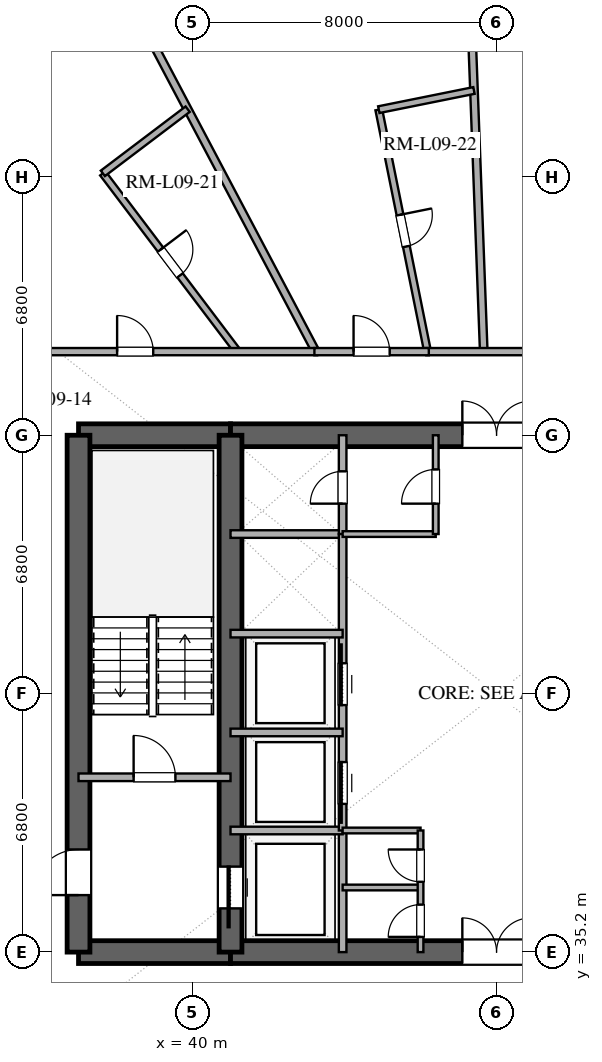
"""IFC4 building model, lengths in metres.
Left out: names, types, materials, properties, quantities, classifications, styles, units other than length and angle.
Written with IfcOpenShell. Run it as: python <this file> out.ifc"""

import sys

from ifc_helpers import new_model, si_unit, direction, frame, frame_2d, origin, place, context, subcontext, project, spatial, rectangle, extrude, element, fill, save


model = new_model("IFC4")
c1 = context("Model", 3, precision=1e-05, world=origin(), true_north=direction((0.0, 1.0)))
c2 = subcontext(c1, "Body", "Model", "MODEL_VIEW")
j1 = project(units=[si_unit("LENGTHUNIT", "METRE"), si_unit("PLANEANGLEUNIT", "RADIAN")], contexts=[c1])
p1 = place(None, origin())
s1 = spatial("IfcSite", under=j1, at=p1, CompositionType="ELEMENT")
p2 = place(p1, origin())
s2 = spatial("IfcBuilding", under=s1, at=p2, CompositionType="ELEMENT")
p3 = place(p2, frame((0.0, 0.0, 42.6)))
s3 = spatial("IfcBuildingStorey", under=s2, at=p3, CompositionType="ELEMENT", Elevation=42.6)
p4 = place(p3, frame((37.0, 35.2, 0.0), z_axis=(0.0, 0.0, 1.0), x_axis=(1.0, 0.0, 0.0)))
e1 = element("IfcWall", 1, at=p4, inside=s3, PredefinedType="SHEAR", context=c2, shape_type="SweptSolid", body=[
    extrude(rectangle(XDim=4.0, YDim=0.6, at=frame_2d((2.0, 0.0))), origin(), (0.0, 0.0, 1.0), 3.38),
])
p5 = place(p3, frame((41.0, 35.2, 0.0), z_axis=(0.0, 0.0, 1.0), x_axis=(1.0, 0.0, 0.0)))
e2 = element("IfcWall", 2, at=p5, inside=s3, PredefinedType="SHEAR", context=c2, shape_type="SweptSolid", body=[
    extrude(rectangle(XDim=14.0, YDim=0.6, at=frame_2d((7.0, 0.0))), origin(), (0.0, 0.0, 1.0), 3.38),
])
p6 = place(p5, frame((6.1, 0.0, 0.0)))
e3 = element("IfcOpeningElement", 3, at=p6, cuts=e2, PredefinedType="OPENING", context=c2, shape_type="SweptSolid", body=[
    extrude(rectangle(XDim=1.8, YDim=2.25, at=frame_2d((0.9, 1.125))), frame((0.0, 0.31, 0.0), z_axis=(0.0, -1.0, 0.0), x_axis=(1.0, 0.0, 0.0)), (0.0, 0.0, 1.0), 0.62),
])
p7 = place(p3, frame((37.0, 48.8, 0.0), z_axis=(0.0, 0.0, 1.0), x_axis=(1.0, 0.0, 0.0)))
e4 = element("IfcWall", 4, at=p7, inside=s3, PredefinedType="SHEAR", context=c2, shape_type="SweptSolid", body=[
    extrude(rectangle(XDim=4.0, YDim=0.6, at=frame_2d((2.0, 0.0))), origin(), (0.0, 0.0, 1.0), 3.38),
])
p8 = place(p3, frame((41.0, 48.8, 0.0), z_axis=(0.0, 0.0, 1.0), x_axis=(1.0, 0.0, 0.0)))
e5 = element("IfcWall", 5, at=p8, inside=s3, PredefinedType="SHEAR", context=c2, shape_type="SweptSolid", body=[
    extrude(rectangle(XDim=14.0, YDim=0.6, at=frame_2d((7.0, 0.0))), origin(), (0.0, 0.0, 1.0), 3.38),
])
p9 = place(p8, frame((6.1, 0.0, 0.0)))
e6 = element("IfcOpeningElement", 6, at=p9, cuts=e5, PredefinedType="OPENING", context=c2, shape_type="SweptSolid", body=[
    extrude(rectangle(XDim=1.8, YDim=2.25, at=frame_2d((0.9, 1.125))), frame((0.0, 0.31, 0.0), z_axis=(0.0, -1.0, 0.0), x_axis=(1.0, 0.0, 0.0)), (0.0, 0.0, 1.0), 0.62),
])
p10 = place(p3, frame((37.0, 35.2, 0.0), z_axis=(0.0, 0.0, 1.0), x_axis=(0.0, 1.0, 0.0)))
e7 = element("IfcWall", 7, at=p10, inside=s3, PredefinedType="SHEAR", context=c2, shape_type="SweptSolid", body=[
    extrude(rectangle(XDim=13.6, YDim=0.6, at=frame_2d((6.8, 0.0))), origin(), (0.0, 0.0, 1.0), 3.38),
])
p11 = place(p10, frame((1.5, 0.0, 0.0)))
e8 = element("IfcOpeningElement", 8, at=p11, cuts=e7, PredefinedType="OPENING", context=c2, shape_type="SweptSolid", body=[
    extrude(rectangle(XDim=1.2, YDim=2.15, at=frame_2d((0.6, 1.075))), frame((0.0, 0.31, 0.0), z_axis=(0.0, -1.0, 0.0), x_axis=(1.0, 0.0, 0.0)), (0.0, 0.0, 1.0), 0.62),
])
p12 = place(p3, frame((41.0, 35.2, 0.0), z_axis=(0.0, 0.0, 1.0), x_axis=(0.0, 1.0, 0.0)))
e9 = element("IfcWall", 9, at=p12, inside=s3, PredefinedType="SHEAR", context=c2, shape_type="SweptSolid", body=[
    extrude(rectangle(XDim=13.6, YDim=0.6, at=frame_2d((6.8, 0.0))), origin(), (0.0, 0.0, 1.0), 3.38),
])
p13 = place(p12, frame((1.15, 0.0, 0.0)))
e10 = element("IfcOpeningElement", 10, at=p13, cuts=e9, PredefinedType="OPENING", context=c2, shape_type="SweptSolid", body=[
    extrude(rectangle(XDim=1.1, YDim=2.2, at=frame_2d((0.55, 1.1))), frame((0.0, 0.31, 0.0), z_axis=(0.0, -1.0, 0.0), x_axis=(1.0, 0.0, 0.0)), (0.0, 0.0, 1.0), 0.62),
])
p14 = place(p3, frame((37.0, 39.8, 0.0), z_axis=(0.0, 0.0, 1.0), x_axis=(1.0, 0.0, 0.0)))
e11 = element("IfcWall", 11, at=p14, inside=s3, PredefinedType="SOLIDWALL", context=c2, shape_type="SweptSolid", body=[
    extrude(rectangle(XDim=4.0, YDim=0.2, at=frame_2d((2.0, 0.0))), origin(), (0.0, 0.0, 1.0), 2.74),
])
p15 = place(p14, frame((1.45, 0.0, 0.0)))
e12 = element("IfcOpeningElement", 12, at=p15, cuts=e11, PredefinedType="OPENING", context=c2, shape_type="SweptSolid", body=[
    extrude(rectangle(XDim=1.1, YDim=2.15, at=frame_2d((0.55, 1.075))), frame((0.0, 0.11, 0.0), z_axis=(0.0, -1.0, 0.0), x_axis=(1.0, 0.0, 0.0)), (0.0, 0.0, 1.0), 0.22),
])
p16 = place(p3, frame((43.95, 35.2, 0.0), z_axis=(0.0, 0.0, 1.0), x_axis=(0.0, 1.0, 0.0)))
e13 = element("IfcWall", 13, at=p16, inside=s3, PredefinedType="SOLIDWALL", context=c2, shape_type="SweptSolid", body=[
    extrude(rectangle(XDim=3.2, YDim=0.2, at=frame_2d((1.6, 0.0))), origin(), (0.0, 0.0, 1.0), 2.74),
])
for number, where, z_axis, x_axis in (
    (14, (41.0, 38.4, 0.0), (0.0, 0.0, 1.0), (1.0, 0.0, 0.0)),
    (15, (41.0, 46.2, 0.0), (0.0, 0.0, 1.0), (1.0, 0.0, 0.0)),
):
    element("IfcWall", number, at=place(p3, frame(where, z_axis=z_axis, x_axis=x_axis)), inside=s3, PredefinedType="SOLIDWALL", context=c2, shape_type="SweptSolid", body=[
        extrude(rectangle(XDim=2.95, YDim=0.2, at=frame_2d((1.475, 0.0))), origin(), (0.0, 0.0, 1.0), 2.74),
    ])
p17 = place(p3, frame((43.95, 46.2, 0.0), z_axis=(0.0, 0.0, 1.0), x_axis=(0.0, 1.0, 0.0)))
e16 = element("IfcWall", 16, at=p17, inside=s3, PredefinedType="SOLIDWALL", context=c2, shape_type="SweptSolid", body=[
    extrude(rectangle(XDim=2.6, YDim=0.2, at=frame_2d((1.3, 0.0))), origin(), (0.0, 0.0, 1.0), 2.74),
])
p18 = place(p17, frame((0.8, 0.0, 0.0)))
e17 = element("IfcOpeningElement", 17, at=p18, cuts=e16, PredefinedType="OPENING", context=c2, shape_type="SweptSolid", body=[
    extrude(rectangle(XDim=0.85, YDim=2.15, at=frame_2d((0.425, 1.075))), frame((0.0, 0.11, 0.0), z_axis=(0.0, -1.0, 0.0), x_axis=(1.0, 0.0, 0.0)), (0.0, 0.0, 1.0), 0.22),
])
p19 = place(p3, frame((43.95, 38.4, 0.0), z_axis=(0.0, 0.0, 1.0), x_axis=(0.0, 1.0, 0.0)))
e18 = element("IfcWall", 18, at=p19, inside=s3, PredefinedType="SOLIDWALL", context=c2, shape_type="SweptSolid", body=[
    extrude(rectangle(XDim=7.8, YDim=0.2, at=frame_2d((3.9, 0.0))), origin(), (0.0, 0.0, 1.0), 2.74),
])
p20 = place(p19, frame((0.7, 0.0, 0.0)))
e19 = element("IfcOpeningElement", 19, at=p20, cuts=e18, PredefinedType="OPENING", context=c2, shape_type="SweptSolid", body=[
    extrude(rectangle(XDim=1.1, YDim=2.2, at=frame_2d((0.55, 1.1))), frame((0.0, 0.11, 0.0), z_axis=(0.0, -1.0, 0.0), x_axis=(1.0, 0.0, 0.0)), (0.0, 0.0, 1.0), 0.22),
])
p21 = place(p19, frame((3.3, 0.0, 0.0)))
e20 = element("IfcOpeningElement", 20, at=p21, cuts=e18, PredefinedType="OPENING", context=c2, shape_type="SweptSolid", body=[
    extrude(rectangle(XDim=1.1, YDim=2.2, at=frame_2d((0.55, 1.1))), frame((0.0, 0.11, 0.0), z_axis=(0.0, -1.0, 0.0), x_axis=(1.0, 0.0, 0.0)), (0.0, 0.0, 1.0), 0.22),
])
for number, where, z_axis, x_axis in (
    (21, (41.0, 40.98, 0.0), (0.0, 0.0, 1.0), (1.0, 0.0, 0.0)),
    (22, (41.0, 43.58, 0.0), (0.0, 0.0, 1.0), (1.0, 0.0, 0.0)),
):
    element("IfcWall", number, at=place(p3, frame(where, z_axis=z_axis, x_axis=x_axis)), inside=s3, PredefinedType="SOLIDWALL", context=c2, shape_type="SweptSolid", body=[
        extrude(rectangle(XDim=2.95, YDim=0.2, at=frame_2d((1.475, 0.0))), origin(), (0.0, 0.0, 1.0), 2.74),
    ])
for number, where, z_axis, x_axis in (
    (23, (43.95, 36.9, 0.0), (0.0, 0.0, 1.0), (1.0, 0.0, 0.0)),
    (24, (43.95, 38.4, 0.0), (0.0, 0.0, 1.0), (1.0, 0.0, 0.0)),
):
    element("IfcWall", number, at=place(p3, frame(where, z_axis=z_axis, x_axis=x_axis)), inside=s3, PredefinedType="PARTITIONING", context=c2, shape_type="SweptSolid", body=[
        extrude(rectangle(XDim=2.05, YDim=0.15, at=frame_2d((1.025, 0.0))), origin(), (0.0, 0.0, 1.0), 2.74),
    ])
p22 = place(p3, frame((46.0, 35.2, 0.0), z_axis=(0.0, 0.0, 1.0), x_axis=(0.0, 1.0, 0.0)))
e25 = element("IfcWall", 25, at=p22, inside=s3, PredefinedType="PARTITIONING", context=c2, shape_type="SweptSolid", body=[
    extrude(rectangle(XDim=3.2, YDim=0.15, at=frame_2d((1.6, 0.0))), origin(), (0.0, 0.0, 1.0), 2.74),
])
p23 = place(p22, frame((0.4, 0.0, 0.0)))
e26 = element("IfcOpeningElement", 26, at=p23, cuts=e25, PredefinedType="OPENING", context=c2, shape_type="SweptSolid", body=[
    extrude(rectangle(XDim=0.85, YDim=2.15, at=frame_2d((0.425, 1.075))), frame((0.0, 0.085, 0.0), z_axis=(0.0, -1.0, 0.0), x_axis=(1.0, 0.0, 0.0)), (0.0, 0.0, 1.0), 0.17),
])
p24 = place(p22, frame((1.85, 0.0, 0.0)))
e27 = element("IfcOpeningElement", 27, at=p24, cuts=e25, PredefinedType="OPENING", context=c2, shape_type="SweptSolid", body=[
    extrude(rectangle(XDim=0.85, YDim=2.15, at=frame_2d((0.425, 1.075))), frame((0.0, 0.085, 0.0), z_axis=(0.0, -1.0, 0.0), x_axis=(1.0, 0.0, 0.0)), (0.0, 0.0, 1.0), 0.17),
])
p25 = place(p3, frame((43.95, 46.2, 0.0), z_axis=(0.0, 0.0, 1.0), x_axis=(1.0, 0.0, 0.0)))
e28 = element("IfcWall", 28, at=p25, inside=s3, PredefinedType="PARTITIONING", context=c2, shape_type="SweptSolid", body=[
    extrude(rectangle(XDim=2.45, YDim=0.15, at=frame_2d((1.225, 0.0))), origin(), (0.0, 0.0, 1.0), 2.74),
])
p26 = place(p3, frame((46.4, 46.2, 0.0), z_axis=(0.0, 0.0, 1.0), x_axis=(0.0, 1.0, 0.0)))
e29 = element("IfcWall", 29, at=p26, inside=s3, PredefinedType="PARTITIONING", context=c2, shape_type="SweptSolid", body=[
    extrude(rectangle(XDim=2.6, YDim=0.15, at=frame_2d((1.3, 0.0))), origin(), (0.0, 0.0, 1.0), 2.74),
])
p27 = place(p26, frame((0.8, 0.0, 0.0)))
e30 = element("IfcOpeningElement", 30, at=p27, cuts=e29, PredefinedType="OPENING", context=c2, shape_type="SweptSolid", body=[
    extrude(rectangle(XDim=0.9, YDim=2.15, at=frame_2d((0.45, 1.075))), frame((0.0, 0.085, 0.0), z_axis=(0.0, -1.0, 0.0), x_axis=(1.0, 0.0, 0.0)), (0.0, 0.0, 1.0), 0.17),
])
p28 = place(p3, frame((47.663, 51.0, 0.0), z_axis=(0.0, 0.0, 1.0), x_axis=(-0.037384345878, 0.999300961014, 0.0)))
e31 = element("IfcWall", 31, at=p28, inside=s3, PredefinedType="PARTITIONING", context=c2, shape_type="SweptSolid", body=[
    extrude(rectangle(XDim=14.877, YDim=0.2, at=frame_2d((7.438, 0.0))), origin(), (0.0, 0.0, 1.0), 2.74),
])
p29 = place(p3, frame((43.243, 51.0, 0.0), z_axis=(0.0, 0.0, 1.0), x_axis=(-0.467270516294, 0.884114395654, 0.0)))
e32 = element("IfcWall", 32, at=p29, inside=s3, PredefinedType="PARTITIONING", context=c2, shape_type="SweptSolid", body=[
    extrude(rectangle(XDim=14.96, YDim=0.2, at=frame_2d((7.48, 0.0))), origin(), (0.0, 0.0, 1.0), 2.74),
])
p30 = place(p3, frame((44.902, 57.367, 0.0), z_axis=(0.0, 0.0, 1.0), x_axis=(0.197648412503, -0.980272974755, 0.0)))
e33 = element("IfcWall", 33, at=p30, inside=s3, PredefinedType="PLUMBINGWALL", context=c2, shape_type="SweptSolid", body=[
    extrude(rectangle(XDim=6.495, YDim=0.18, at=frame_2d((3.248, 0.0))), origin(), (0.0, 0.0, 1.0), 2.74),
])
p31 = place(p30, frame((2.823, 0.0, 0.0)))
e34 = element("IfcOpeningElement", 34, at=p31, cuts=e33, PredefinedType="OPENING", context=c2, shape_type="SweptSolid", body=[
    extrude(rectangle(XDim=0.85, YDim=2.1, at=frame_2d((0.425, 1.05))), frame((0.0, 0.1, 0.0), z_axis=(0.0, -1.0, 0.0), x_axis=(1.0, 0.0, 0.0)), (0.0, 0.0, 1.0), 0.2),
])
p32 = place(p3, frame((37.64, 55.691, 0.0), z_axis=(0.0, 0.0, 1.0), x_axis=(0.603401299207, -0.797437691682, 0.0)))
e35 = element("IfcWall", 35, at=p32, inside=s3, PredefinedType="PLUMBINGWALL", context=c2, shape_type="SweptSolid", body=[
    extrude(rectangle(XDim=5.882, YDim=0.18, at=frame_2d((2.941, 0.0))), origin(), (0.0, 0.0, 1.0), 2.74),
])
p33 = place(p32, frame((2.516, 0.0, 0.0)))
e36 = element("IfcOpeningElement", 36, at=p33, cuts=e35, PredefinedType="OPENING", context=c2, shape_type="SweptSolid", body=[
    extrude(rectangle(XDim=0.85, YDim=2.1, at=frame_2d((0.425, 1.05))), frame((0.0, 0.1, 0.0), z_axis=(0.0, -1.0, 0.0), x_axis=(1.0, 0.0, 0.0)), (0.0, 0.0, 1.0), 0.2),
])
p34 = place(p3, frame((34.8, 51.0, 0.0), z_axis=(0.0, 0.0, 1.0), x_axis=(1.0, 0.0, 0.0)))
e37 = element("IfcWall", 37, at=p34, inside=s3, PredefinedType="PARTITIONING", context=c2, shape_type="SweptSolid", body=[
    extrude(rectangle(XDim=8.479, YDim=0.19, at=frame_2d((4.24, 0.0))), origin(), (0.0, 0.0, 1.0), 2.74),
])
p35 = place(p34, frame((3.216, 0.0, 0.0)))
e38 = element("IfcOpeningElement", 38, at=p35, cuts=e37, PredefinedType="OPENING", context=c2, shape_type="SweptSolid", body=[
    extrude(rectangle(XDim=0.95, YDim=2.15, at=frame_2d((0.475, 1.075))), frame((0.0, 0.105, 0.0), z_axis=(0.0, -1.0, 0.0), x_axis=(1.0, 0.0, 0.0)), (0.0, 0.0, 1.0), 0.21),
])
p36 = place(p3, frame((46.153, 51.0, 0.0), z_axis=(0.0, 0.0, 1.0), x_axis=(1.0, 0.0, 0.0)))
e39 = element("IfcWall", 39, at=p36, inside=s3, PredefinedType="PARTITIONING", context=c2, shape_type="SweptSolid", body=[
    extrude(rectangle(XDim=15.047, YDim=0.19, at=frame_2d((7.524, 0.0))), origin(), (0.0, 0.0, 1.0), 2.74),
])
p37 = place(p36, frame((3.144, 0.0, 0.0)))
e40 = element("IfcOpeningElement", 40, at=p37, cuts=e39, PredefinedType="OPENING", context=c2, shape_type="SweptSolid", body=[
    extrude(rectangle(XDim=1.0, YDim=2.2, at=frame_2d((0.5, 1.1))), frame((0.0, 0.105, 0.0), z_axis=(0.0, -1.0, 0.0), x_axis=(1.0, 0.0, 0.0)), (0.0, 0.0, 1.0), 0.21),
])
p38 = place(p36, frame((7.119, 0.0, 0.0)))
e41 = element("IfcOpeningElement", 41, at=p38, cuts=e39, PredefinedType="OPENING", context=c2, shape_type="SweptSolid", body=[
    extrude(rectangle(XDim=0.95, YDim=2.15, at=frame_2d((0.475, 1.075))), frame((0.0, 0.105, 0.0), z_axis=(0.0, -1.0, 0.0), x_axis=(1.0, 0.0, 0.0)), (0.0, 0.0, 1.0), 0.21),
])
p39 = place(p3, frame((43.207, 51.0, 0.0), z_axis=(0.0, 0.0, 1.0), x_axis=(1.0, 0.0, 0.0)))
e42 = element("IfcWall", 42, at=p39, inside=s3, PredefinedType="PARTITIONING", context=c2, shape_type="SweptSolid", body=[
    extrude(rectangle(XDim=3.011, YDim=0.19, at=frame_2d((1.505, 0.0))), origin(), (0.0, 0.0, 1.0), 2.74),
])
p40 = place(p39, frame((1.03, 0.0, 0.0)))
e43 = element("IfcOpeningElement", 43, at=p40, cuts=e42, PredefinedType="OPENING", context=c2, shape_type="SweptSolid", body=[
    extrude(rectangle(XDim=0.95, YDim=2.15, at=frame_2d((0.475, 1.075))), frame((0.0, 0.105, 0.0), z_axis=(0.0, -1.0, 0.0), x_axis=(1.0, 0.0, 0.0)), (0.0, 0.0, 1.0), 0.21),
])
p41 = place(p3, frame((39.872, 57.379, 0.0), z_axis=(0.0, 0.0, 1.0), x_axis=(-0.797438154909, -0.603400687019, 0.0)))
e44 = element("IfcWall", 44, at=p41, inside=s3, PredefinedType="PLUMBINGWALL", context=c2, shape_type="SweptSolid", body=[
    extrude(rectangle(XDim=2.798, YDim=0.18, at=frame_2d((1.399, 0.0))), origin(), (0.0, 0.0, 1.0), 2.74),
])
p42 = place(p3, frame((47.406, 57.872, 0.0), z_axis=(0.0, 0.0, 1.0), x_axis=(-0.980278128955, -0.1976228476, 0.0)))
e45 = element("IfcWall", 45, at=p42, inside=s3, PredefinedType="PLUMBINGWALL", context=c2, shape_type="SweptSolid", body=[
    extrude(rectangle(XDim=2.555, YDim=0.18, at=frame_2d((1.277, 0.0))), origin(), (0.0, 0.0, 1.0), 2.74),
])
p43 = place(p13, origin())
e46 = element("IfcDoor", 46, at=p43, inside=s3, OperationType="SLIDING_TO_LEFT", PredefinedType="DOOR", context=c2, shape_type="SweptSolid", body=[
    extrude(rectangle(XDim=1.1, YDim=2.2, at=frame_2d((0.55, 1.1))), frame((0.0, 0.025, 0.0), z_axis=(0.0, -1.0, 0.0), x_axis=(1.0, 0.0, 0.0)), (0.0, 0.0, 1.0), 0.05),
])
fill(e10, e46)
p44 = place(p11, origin())
e47 = element("IfcDoor", 47, at=p44, inside=s3, OperationType="SINGLE_SWING_LEFT", PredefinedType="DOOR", context=c2, shape_type="SweptSolid", body=[
    extrude(rectangle(XDim=1.2, YDim=2.15, at=frame_2d((0.6, 1.075))), frame((0.0, 0.025, 0.0), z_axis=(0.0, -1.0, 0.0), x_axis=(1.0, 0.0, 0.0)), (0.0, 0.0, 1.0), 0.05),
])
fill(e8, e47)
p45 = place(p6, origin())
e48 = element("IfcDoor", 48, at=p45, inside=s3, OperationType="DOUBLE_DOOR_SINGLE_SWING", PredefinedType="DOOR", context=c2, shape_type="SweptSolid", body=[
    extrude(rectangle(XDim=1.8, YDim=2.25, at=frame_2d((0.9, 1.125))), frame((0.0, 0.025, 0.0), z_axis=(0.0, -1.0, 0.0), x_axis=(1.0, 0.0, 0.0)), (0.0, 0.0, 1.0), 0.05),
])
fill(e3, e48)
p46 = place(p9, origin())
e49 = element("IfcDoor", 49, at=p46, inside=s3, OperationType="DOUBLE_DOOR_SINGLE_SWING", PredefinedType="DOOR", context=c2, shape_type="SweptSolid", body=[
    extrude(rectangle(XDim=1.8, YDim=2.25, at=frame_2d((0.9, 1.125))), frame((0.0, 0.025, 0.0), z_axis=(0.0, -1.0, 0.0), x_axis=(1.0, 0.0, 0.0)), (0.0, 0.0, 1.0), 0.05),
])
fill(e6, e49)
p47 = place(p15, origin())
e50 = element("IfcDoor", 50, at=p47, inside=s3, OperationType="SINGLE_SWING_LEFT", PredefinedType="DOOR", context=c2, shape_type="SweptSolid", body=[
    extrude(rectangle(XDim=1.1, YDim=2.15, at=frame_2d((0.55, 1.075))), frame((0.0, 0.025, 0.0), z_axis=(0.0, -1.0, 0.0), x_axis=(1.0, 0.0, 0.0)), (0.0, 0.0, 1.0), 0.05),
])
fill(e12, e50)
p48 = place(p18, origin())
e51 = element("IfcDoor", 51, at=p48, inside=s3, OperationType="SINGLE_SWING_LEFT", PredefinedType="DOOR", context=c2, shape_type="SweptSolid", body=[
    extrude(rectangle(XDim=0.85, YDim=2.15, at=frame_2d((0.425, 1.075))), frame((0.0, 0.025, 0.0), z_axis=(0.0, -1.0, 0.0), x_axis=(1.0, 0.0, 0.0)), (0.0, 0.0, 1.0), 0.05),
])
fill(e17, e51)
p49 = place(p20, origin())
e52 = element("IfcDoor", 52, at=p49, inside=s3, OperationType="SLIDING_TO_LEFT", PredefinedType="DOOR", context=c2, shape_type="SweptSolid", body=[
    extrude(rectangle(XDim=1.1, YDim=2.2, at=frame_2d((0.55, 1.1))), frame((0.0, 0.025, 0.0), z_axis=(0.0, -1.0, 0.0), x_axis=(1.0, 0.0, 0.0)), (0.0, 0.0, 1.0), 0.05),
])
fill(e19, e52)
p50 = place(p21, origin())
e53 = element("IfcDoor", 53, at=p50, inside=s3, OperationType="SLIDING_TO_RIGHT", PredefinedType="DOOR", context=c2, shape_type="SweptSolid", body=[
    extrude(rectangle(XDim=1.1, YDim=2.2, at=frame_2d((0.55, 1.1))), frame((0.0, 0.025, 0.0), z_axis=(0.0, -1.0, 0.0), x_axis=(1.0, 0.0, 0.0)), (0.0, 0.0, 1.0), 0.05),
])
fill(e20, e53)
p51 = place(p23, origin())
e54 = element("IfcDoor", 54, at=p51, inside=s3, OperationType="SINGLE_SWING_LEFT", PredefinedType="DOOR", context=c2, shape_type="SweptSolid", body=[
    extrude(rectangle(XDim=0.85, YDim=2.15, at=frame_2d((0.425, 1.075))), frame((0.0, 0.025, 0.0), z_axis=(0.0, -1.0, 0.0), x_axis=(1.0, 0.0, 0.0)), (0.0, 0.0, 1.0), 0.05),
])
fill(e26, e54)
p52 = place(p24, origin())
e55 = element("IfcDoor", 55, at=p52, inside=s3, OperationType="SINGLE_SWING_RIGHT", PredefinedType="DOOR", context=c2, shape_type="SweptSolid", body=[
    extrude(rectangle(XDim=0.85, YDim=2.15, at=frame_2d((0.425, 1.075))), frame((0.0, 0.025, 0.0), z_axis=(0.0, -1.0, 0.0), x_axis=(1.0, 0.0, 0.0)), (0.0, 0.0, 1.0), 0.05),
])
fill(e27, e55)
p53 = place(p27, origin())
e56 = element("IfcDoor", 56, at=p53, inside=s3, OperationType="SINGLE_SWING_LEFT", PredefinedType="DOOR", context=c2, shape_type="SweptSolid", body=[
    extrude(rectangle(XDim=0.9, YDim=2.15, at=frame_2d((0.45, 1.075))), frame((0.0, 0.025, 0.0), z_axis=(0.0, -1.0, 0.0), x_axis=(1.0, 0.0, 0.0)), (0.0, 0.0, 1.0), 0.05),
])
fill(e30, e56)
p54 = place(p31, origin())
e57 = element("IfcDoor", 57, at=p54, inside=s3, OperationType="SINGLE_SWING_LEFT", PredefinedType="DOOR", context=c2, shape_type="SweptSolid", body=[
    extrude(rectangle(XDim=0.85, YDim=2.1, at=frame_2d((0.425, 1.05))), frame((0.0, 0.025, 0.0), z_axis=(0.0, -1.0, 0.0), x_axis=(1.0, 0.0, 0.0)), (0.0, 0.0, 1.0), 0.05),
])
fill(e34, e57)
p55 = place(p33, origin())
e58 = element("IfcDoor", 58, at=p55, inside=s3, OperationType="SINGLE_SWING_LEFT", PredefinedType="DOOR", context=c2, shape_type="SweptSolid", body=[
    extrude(rectangle(XDim=0.85, YDim=2.1, at=frame_2d((0.425, 1.05))), frame((0.0, 0.025, 0.0), z_axis=(0.0, -1.0, 0.0), x_axis=(1.0, 0.0, 0.0)), (0.0, 0.0, 1.0), 0.05),
])
fill(e36, e58)
p56 = place(p35, origin())
e59 = element("IfcDoor", 59, at=p56, inside=s3, OperationType="SINGLE_SWING_LEFT", PredefinedType="DOOR", context=c2, shape_type="SweptSolid", body=[
    extrude(rectangle(XDim=0.95, YDim=2.15, at=frame_2d((0.475, 1.075))), frame((0.0, 0.025, 0.0), z_axis=(0.0, -1.0, 0.0), x_axis=(1.0, 0.0, 0.0)), (0.0, 0.0, 1.0), 0.05),
])
fill(e38, e59)
p57 = place(p40, origin())
e60 = element("IfcDoor", 60, at=p57, inside=s3, OperationType="SINGLE_SWING_LEFT", PredefinedType="DOOR", context=c2, shape_type="SweptSolid", body=[
    extrude(rectangle(XDim=0.95, YDim=2.15, at=frame_2d((0.475, 1.075))), frame((0.0, 0.025, 0.0), z_axis=(0.0, -1.0, 0.0), x_axis=(1.0, 0.0, 0.0)), (0.0, 0.0, 1.0), 0.05),
])
fill(e43, e60)
save(model, sys.argv[1])
